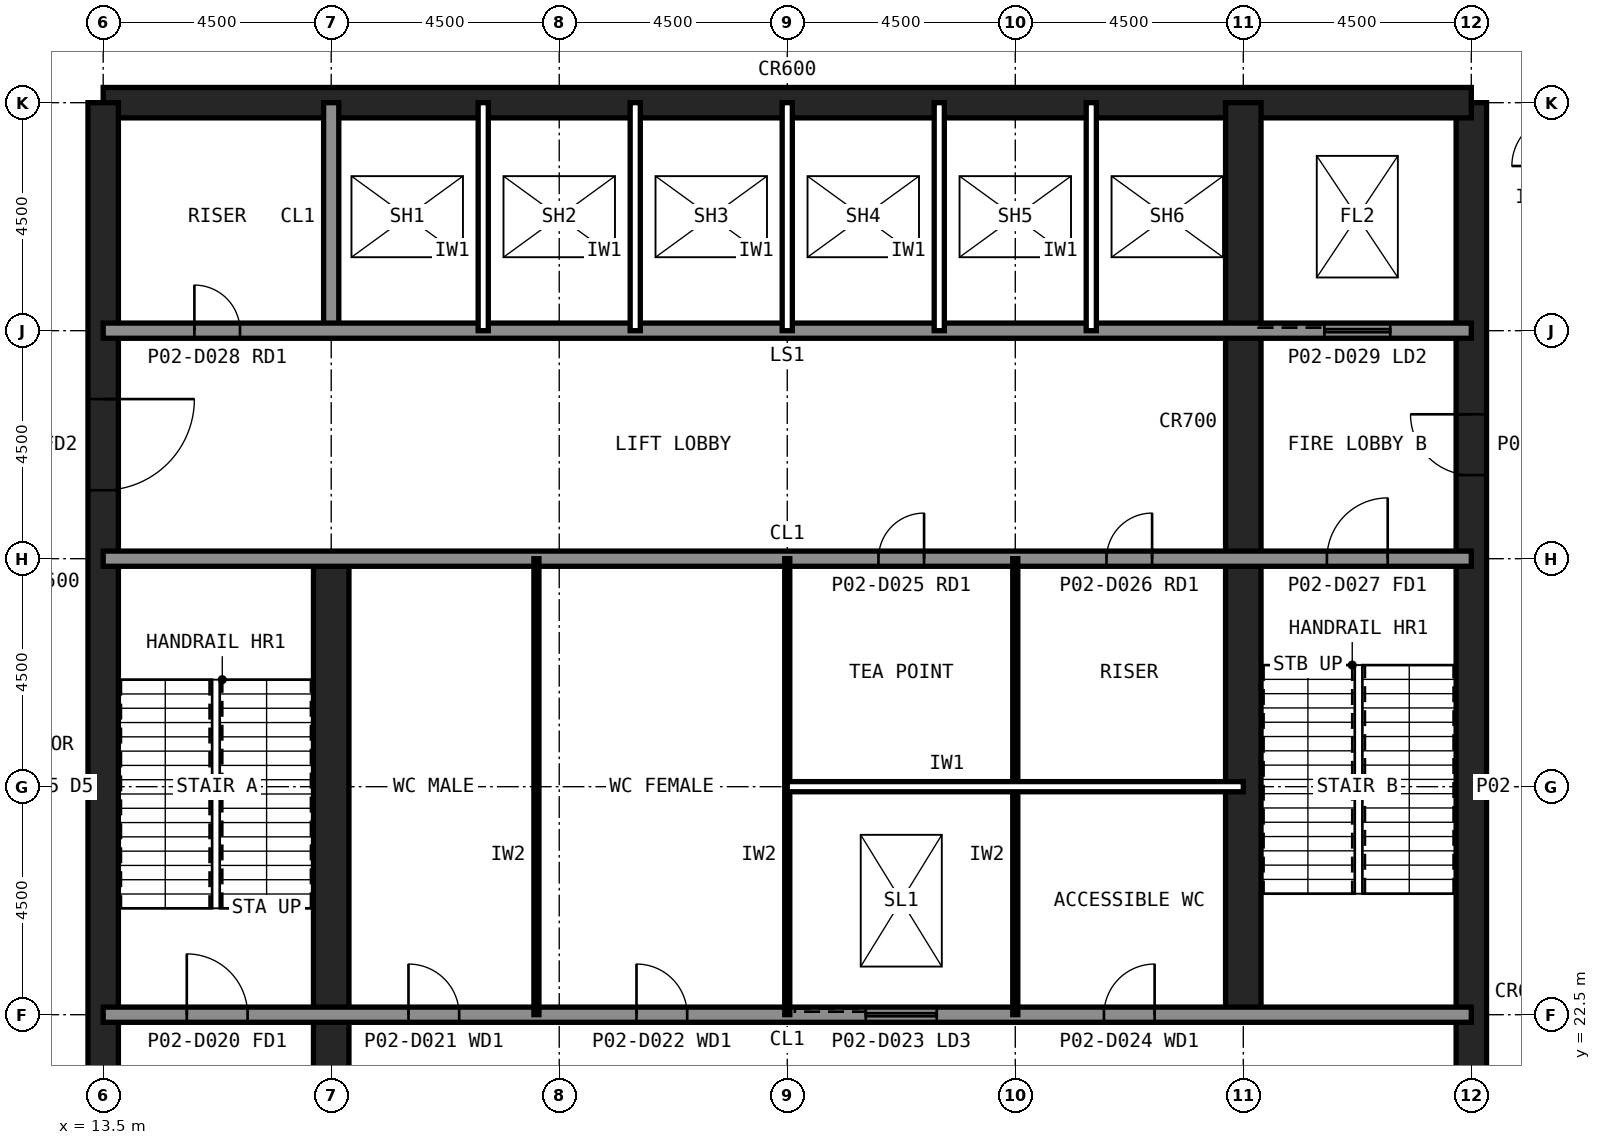
"""IFC4 building model, lengths in metres.
Left out: names, types, materials, properties, quantities, classifications, styles, units other than length and angle.
Written with IfcOpenShell. Run it as: python <this file> out.ifc"""

import sys

from ifc_helpers import new_model, si_unit, direction, frame, frame_2d, origin, place, context, subcontext, project, spatial, rectangle, extrude, element, fill, save


model = new_model("IFC4")
c1 = context("Model", 3, precision=1e-05, world=origin(), true_north=direction((0.0, 1.0)))
c2 = subcontext(c1, "Body", "Model", "MODEL_VIEW")
j1 = project(units=[si_unit("LENGTHUNIT", "METRE"), si_unit("PLANEANGLEUNIT", "RADIAN")], contexts=[c1])
p1 = place(None, origin())
s1 = spatial("IfcSite", under=j1, at=p1, CompositionType="ELEMENT")
p2 = place(p1, origin())
s2 = spatial("IfcBuilding", under=s1, at=p2, CompositionType="ELEMENT")
p3 = place(p2, frame((0.0, 0.0, 6.0)))
s3 = spatial("IfcBuildingStorey", under=s2, at=p3, CompositionType="ELEMENT", Elevation=6.0)
p4 = place(p3, frame((40.5, 13.5, 0.0), z_axis=(0.0, 0.0, 1.0), x_axis=(0.0, 1.0, 0.0)))
e1 = element("IfcWall", 1, at=p4, inside=s3, PredefinedType="SHEAR", context=c2, shape_type="SweptSolid", body=[
    extrude(rectangle(XDim=27.0, YDim=0.6, at=frame_2d((13.5, 0.0))), origin(), (0.0, 0.0, 1.0), 6.0),
])
p5 = place(p4, frame((5.85, 0.0, 0.0)))
e2 = element("IfcOpeningElement", 2, at=p5, cuts=e1, PredefinedType="OPENING", context=c2, shape_type="SweptSolid", body=[
    extrude(rectangle(XDim=1.8, YDim=2.1, at=frame_2d((0.9, 1.05))), frame((0.0, 0.31, 0.0), z_axis=(0.0, -1.0, 0.0), x_axis=(1.0, 0.0, 0.0)), (0.0, 0.0, 1.0), 0.62),
])
p6 = place(p4, frame((19.65, 0.0, 0.0)))
e3 = element("IfcOpeningElement", 3, at=p6, cuts=e1, PredefinedType="OPENING", context=c2, shape_type="SweptSolid", body=[
    extrude(rectangle(XDim=1.2, YDim=2.1, at=frame_2d((0.6, 1.05))), frame((0.0, 0.31, 0.0), z_axis=(0.0, -1.0, 0.0), x_axis=(1.0, 0.0, 0.0)), (0.0, 0.0, 1.0), 0.62),
])
p7 = place(p3, frame((40.5, 40.5, 0.0), z_axis=(0.0, 0.0, 1.0), x_axis=(-1.0, 0.0, 0.0)))
e4 = element("IfcWall", 4, at=p7, inside=s3, PredefinedType="SHEAR", context=c2, shape_type="SweptSolid", body=[
    extrude(rectangle(XDim=27.0, YDim=0.6, at=frame_2d((13.5, 0.0))), origin(), (0.0, 0.0, 1.0), 6.0),
])
p8 = place(p3, frame((13.5, 40.5, 0.0), z_axis=(0.0, 0.0, 1.0), x_axis=(0.0, -1.0, 0.0)))
e5 = element("IfcWall", 5, at=p8, inside=s3, PredefinedType="SHEAR", context=c2, shape_type="SweptSolid", body=[
    extrude(rectangle(XDim=27.0, YDim=0.6, at=frame_2d((13.5, 0.0))), origin(), (0.0, 0.0, 1.0), 6.0),
])
p9 = place(p8, frame((19.65, 0.0, 0.0)))
e6 = element("IfcOpeningElement", 6, at=p9, cuts=e5, PredefinedType="OPENING", context=c2, shape_type="SweptSolid", body=[
    extrude(rectangle(XDim=1.2, YDim=2.1, at=frame_2d((0.6, 1.05))), frame((0.0, 0.31, 0.0), z_axis=(0.0, -1.0, 0.0), x_axis=(1.0, 0.0, 0.0)), (0.0, 0.0, 1.0), 0.62),
])
p10 = place(p8, frame((5.85, 0.0, 0.0)))
e7 = element("IfcOpeningElement", 7, at=p10, cuts=e5, PredefinedType="OPENING", context=c2, shape_type="SweptSolid", body=[
    extrude(rectangle(XDim=1.8, YDim=2.1, at=frame_2d((0.9, 1.05))), frame((0.0, 0.31, 0.0), z_axis=(0.0, -1.0, 0.0), x_axis=(1.0, 0.0, 0.0)), (0.0, 0.0, 1.0), 0.62),
])
p11 = place(p3, frame((18.0, 13.5, 0.0), z_axis=(0.0, 0.0, 1.0), x_axis=(0.0, 1.0, 0.0)))
e8 = element("IfcWall", 8, at=p11, inside=s3, PredefinedType="SHEAR", context=c2, shape_type="SweptSolid", body=[
    extrude(rectangle(XDim=18.0, YDim=0.7, at=frame_2d((9.0, 0.0))), origin(), (0.0, 0.0, 1.0), 6.0),
])
p12 = place(p3, frame((18.0, 36.0, 0.0), z_axis=(0.0, 0.0, 1.0), x_axis=(0.0, 1.0, 0.0)))
e9 = element("IfcWall", 9, at=p12, inside=s3, PredefinedType="SOLIDWALL", context=c2, shape_type="SweptSolid", body=[
    extrude(rectangle(XDim=4.5, YDim=0.3, at=frame_2d((2.25, 0.0))), origin(), (0.0, 0.0, 1.0), 5.8),
])
p13 = place(p3, frame((36.0, 22.5, 0.0), z_axis=(0.0, 0.0, 1.0), x_axis=(0.0, 1.0, 0.0)))
e10 = element("IfcWall", 10, at=p13, inside=s3, PredefinedType="SHEAR", context=c2, shape_type="SweptSolid", body=[
    extrude(rectangle(XDim=18.0, YDim=0.7, at=frame_2d((9.0, 0.0))), origin(), (0.0, 0.0, 1.0), 6.0),
])
p14 = place(p3, frame((13.5, 36.0, 0.0), z_axis=(0.0, 0.0, 1.0), x_axis=(1.0, 0.0, 0.0)))
e11 = element("IfcWall", 11, at=p14, inside=s3, PredefinedType="SOLIDWALL", context=c2, shape_type="SweptSolid", body=[
    extrude(rectangle(XDim=27.0, YDim=0.3, at=frame_2d((13.5, 0.0))), origin(), (0.0, 0.0, 1.0), 5.8),
])
p15 = place(p14, frame((1.8, 0.0, 0.0)))
e12 = element("IfcOpeningElement", 12, at=p15, cuts=e11, PredefinedType="OPENING", context=c2, shape_type="SweptSolid", body=[
    extrude(rectangle(XDim=0.9, YDim=2.1, at=frame_2d((0.45, 1.05))), frame((0.0, 0.16, 0.0), z_axis=(0.0, -1.0, 0.0), x_axis=(1.0, 0.0, 0.0)), (0.0, 0.0, 1.0), 0.32),
])
p16 = place(p14, frame((24.1, 0.0, 0.0)))
e13 = element("IfcOpeningElement", 13, at=p16, cuts=e11, PredefinedType="OPENING", context=c2, shape_type="SweptSolid", body=[
    extrude(rectangle(XDim=1.3, YDim=2.2, at=frame_2d((0.65, 1.1))), frame((0.0, 0.16, 0.0), z_axis=(0.0, -1.0, 0.0), x_axis=(1.0, 0.0, 0.0)), (0.0, 0.0, 1.0), 0.32),
])
p17 = place(p3, frame((13.5, 22.5, 0.0), z_axis=(0.0, 0.0, 1.0), x_axis=(1.0, 0.0, 0.0)))
e14 = element("IfcWall", 14, at=p17, inside=s3, PredefinedType="SOLIDWALL", context=c2, shape_type="SweptSolid", body=[
    extrude(rectangle(XDim=27.0, YDim=0.3, at=frame_2d((13.5, 0.0))), origin(), (0.0, 0.0, 1.0), 5.8),
])
p18 = place(p17, frame((1.65, 0.0, 0.0)))
e15 = element("IfcOpeningElement", 15, at=p18, cuts=e14, PredefinedType="OPENING", context=c2, shape_type="SweptSolid", body=[
    extrude(rectangle(XDim=1.2, YDim=2.1, at=frame_2d((0.6, 1.05))), frame((0.0, 0.16, 0.0), z_axis=(0.0, -1.0, 0.0), x_axis=(1.0, 0.0, 0.0)), (0.0, 0.0, 1.0), 0.32),
])
p19 = place(p17, frame((6.025, 0.0, 0.0)))
e16 = element("IfcOpeningElement", 16, at=p19, cuts=e14, PredefinedType="OPENING", context=c2, shape_type="SweptSolid", body=[
    extrude(rectangle(XDim=1.0, YDim=2.1, at=frame_2d((0.5, 1.05))), frame((0.0, 0.16, 0.0), z_axis=(0.0, -1.0, 0.0), x_axis=(1.0, 0.0, 0.0)), (0.0, 0.0, 1.0), 0.32),
])
p20 = place(p17, frame((10.525, 0.0, 0.0)))
e17 = element("IfcOpeningElement", 17, at=p20, cuts=e14, PredefinedType="OPENING", context=c2, shape_type="SweptSolid", body=[
    extrude(rectangle(XDim=1.0, YDim=2.1, at=frame_2d((0.5, 1.05))), frame((0.0, 0.16, 0.0), z_axis=(0.0, -1.0, 0.0), x_axis=(1.0, 0.0, 0.0)), (0.0, 0.0, 1.0), 0.32),
])
p21 = place(p17, frame((19.75, 0.0, 0.0)))
e18 = element("IfcOpeningElement", 18, at=p21, cuts=e14, PredefinedType="OPENING", context=c2, shape_type="SweptSolid", body=[
    extrude(rectangle(XDim=1.0, YDim=2.1, at=frame_2d((0.5, 1.05))), frame((0.0, 0.16, 0.0), z_axis=(0.0, -1.0, 0.0), x_axis=(1.0, 0.0, 0.0)), (0.0, 0.0, 1.0), 0.32),
])
p22 = place(p17, frame((15.05, 0.0, 0.0)))
e19 = element("IfcOpeningElement", 19, at=p22, cuts=e14, PredefinedType="OPENING", context=c2, shape_type="SweptSolid", body=[
    extrude(rectangle(XDim=1.4, YDim=2.4, at=frame_2d((0.7, 1.2))), frame((0.0, 0.16, 0.0), z_axis=(0.0, -1.0, 0.0), x_axis=(1.0, 0.0, 0.0)), (0.0, 0.0, 1.0), 0.32),
])
p23 = place(p3, frame((13.5, 31.5, 0.0), z_axis=(0.0, 0.0, 1.0), x_axis=(1.0, 0.0, 0.0)))
e20 = element("IfcWall", 20, at=p23, inside=s3, PredefinedType="SOLIDWALL", context=c2, shape_type="SweptSolid", body=[
    extrude(rectangle(XDim=27.0, YDim=0.3, at=frame_2d((13.5, 0.0))), origin(), (0.0, 0.0, 1.0), 5.8),
])
p24 = place(p23, frame((24.15, 0.0, 0.0)))
e21 = element("IfcOpeningElement", 21, at=p24, cuts=e20, PredefinedType="OPENING", context=c2, shape_type="SweptSolid", body=[
    extrude(rectangle(XDim=1.2, YDim=2.1, at=frame_2d((0.6, 1.05))), frame((0.0, 0.16, 0.0), z_axis=(0.0, -1.0, 0.0), x_axis=(1.0, 0.0, 0.0)), (0.0, 0.0, 1.0), 0.32),
])
p25 = place(p23, frame((15.3, 0.0, 0.0)))
e22 = element("IfcOpeningElement", 22, at=p25, cuts=e20, PredefinedType="OPENING", context=c2, shape_type="SweptSolid", body=[
    extrude(rectangle(XDim=0.9, YDim=2.1, at=frame_2d((0.45, 1.05))), frame((0.0, 0.16, 0.0), z_axis=(0.0, -1.0, 0.0), x_axis=(1.0, 0.0, 0.0)), (0.0, 0.0, 1.0), 0.32),
])
p26 = place(p23, frame((19.8, 0.0, 0.0)))
e23 = element("IfcOpeningElement", 23, at=p26, cuts=e20, PredefinedType="OPENING", context=c2, shape_type="SweptSolid", body=[
    extrude(rectangle(XDim=0.9, YDim=2.1, at=frame_2d((0.45, 1.05))), frame((0.0, 0.16, 0.0), z_axis=(0.0, -1.0, 0.0), x_axis=(1.0, 0.0, 0.0)), (0.0, 0.0, 1.0), 0.32),
])
for number, where, z_axis, x_axis in (
    (24, (21.0, 36.0, 0.0), (0.0, 0.0, 1.0), (0.0, 1.0, 0.0)),
    (25, (24.0, 36.0, 0.0), (0.0, 0.0, 1.0), (0.0, 1.0, 0.0)),
    (26, (27.0, 36.0, 0.0), (0.0, 0.0, 1.0), (0.0, 1.0, 0.0)),
    (27, (30.0, 36.0, 0.0), (0.0, 0.0, 1.0), (0.0, 1.0, 0.0)),
    (28, (33.0, 36.0, 0.0), (0.0, 0.0, 1.0), (0.0, 1.0, 0.0)),
):
    element("IfcWall", number, at=place(p3, frame(where, z_axis=z_axis, x_axis=x_axis)), inside=s3, PredefinedType="PARTITIONING", context=c2, shape_type="SweptSolid", body=[
        extrude(rectangle(XDim=4.5, YDim=0.2, at=frame_2d((2.25, 0.0))), origin(), (0.0, 0.0, 1.0), 5.8),
    ])
for number, where, z_axis, x_axis in (
    (29, (22.05, 22.5, 0.0), (0.0, 0.0, 1.0), (0.0, 1.0, 0.0)),
    (30, (27.0, 22.5, 0.0), (0.0, 0.0, 1.0), (0.0, 1.0, 0.0)),
    (31, (31.5, 22.5, 0.0), (0.0, 0.0, 1.0), (0.0, 1.0, 0.0)),
):
    element("IfcWall", number, at=place(p3, frame(where, z_axis=z_axis, x_axis=x_axis)), inside=s3, PredefinedType="PLUMBINGWALL", context=c2, shape_type="SweptSolid", body=[
        extrude(rectangle(XDim=9.0, YDim=0.1, at=frame_2d((4.5, 0.0))), origin(), (0.0, 0.0, 1.0), 5.8),
    ])
p27 = place(p3, frame((27.0, 27.0, 0.0), z_axis=(0.0, 0.0, 1.0), x_axis=(1.0, 0.0, 0.0)))
e32 = element("IfcWall", 32, at=p27, inside=s3, PredefinedType="PARTITIONING", context=c2, shape_type="SweptSolid", body=[
    extrude(rectangle(XDim=9.0, YDim=0.2, at=frame_2d((4.5, 0.0))), origin(), (0.0, 0.0, 1.0), 5.8),
])
p28 = place(p10, origin())
e33 = element("IfcDoor", 33, at=p28, inside=s3, OperationType="SINGLE_SWING_LEFT", PredefinedType="DOOR", context=c2, shape_type="SweptSolid", body=[
    extrude(rectangle(XDim=1.8, YDim=2.1, at=frame_2d((0.9, 1.05))), frame((0.0, 0.025, 0.0), z_axis=(0.0, -1.0, 0.0), x_axis=(1.0, 0.0, 0.0)), (0.0, 0.0, 1.0), 0.05),
])
fill(e7, e33)
p29 = place(p6, origin())
e34 = element("IfcDoor", 34, at=p29, inside=s3, OperationType="SINGLE_SWING_RIGHT", PredefinedType="DOOR", context=c2, shape_type="SweptSolid", body=[
    extrude(rectangle(XDim=1.2, YDim=2.1, at=frame_2d((0.6, 1.05))), frame((0.0, 0.025, 0.0), z_axis=(0.0, -1.0, 0.0), x_axis=(1.0, 0.0, 0.0)), (0.0, 0.0, 1.0), 0.05),
])
fill(e3, e34)
p30 = place(p18, origin())
e35 = element("IfcDoor", 35, at=p30, inside=s3, OperationType="SINGLE_SWING_LEFT", PredefinedType="DOOR", context=c2, shape_type="SweptSolid", body=[
    extrude(rectangle(XDim=1.2, YDim=2.1, at=frame_2d((0.6, 1.05))), frame((0.0, 0.025, 0.0), z_axis=(0.0, -1.0, 0.0), x_axis=(1.0, 0.0, 0.0)), (0.0, 0.0, 1.0), 0.05),
])
fill(e15, e35)
p31 = place(p24, origin())
e36 = element("IfcDoor", 36, at=p31, inside=s3, OperationType="SINGLE_SWING_RIGHT", PredefinedType="DOOR", context=c2, shape_type="SweptSolid", body=[
    extrude(rectangle(XDim=1.2, YDim=2.1, at=frame_2d((0.6, 1.05))), frame((0.0, 0.025, 0.0), z_axis=(0.0, -1.0, 0.0), x_axis=(1.0, 0.0, 0.0)), (0.0, 0.0, 1.0), 0.05),
])
fill(e21, e36)
p32 = place(p19, origin())
e37 = element("IfcDoor", 37, at=p32, inside=s3, OperationType="SINGLE_SWING_LEFT", PredefinedType="DOOR", context=c2, shape_type="SweptSolid", body=[
    extrude(rectangle(XDim=1.0, YDim=2.1, at=frame_2d((0.5, 1.05))), frame((0.0, 0.025, 0.0), z_axis=(0.0, -1.0, 0.0), x_axis=(1.0, 0.0, 0.0)), (0.0, 0.0, 1.0), 0.05),
])
fill(e16, e37)
p33 = place(p20, origin())
e38 = element("IfcDoor", 38, at=p33, inside=s3, OperationType="SINGLE_SWING_LEFT", PredefinedType="DOOR", context=c2, shape_type="SweptSolid", body=[
    extrude(rectangle(XDim=1.0, YDim=2.1, at=frame_2d((0.5, 1.05))), frame((0.0, 0.025, 0.0), z_axis=(0.0, -1.0, 0.0), x_axis=(1.0, 0.0, 0.0)), (0.0, 0.0, 1.0), 0.05),
])
fill(e17, e38)
p34 = place(p21, origin())
e39 = element("IfcDoor", 39, at=p34, inside=s3, OperationType="SINGLE_SWING_RIGHT", PredefinedType="DOOR", context=c2, shape_type="SweptSolid", body=[
    extrude(rectangle(XDim=1.0, YDim=2.1, at=frame_2d((0.5, 1.05))), frame((0.0, 0.025, 0.0), z_axis=(0.0, -1.0, 0.0), x_axis=(1.0, 0.0, 0.0)), (0.0, 0.0, 1.0), 0.05),
])
fill(e18, e39)
p35 = place(p25, origin())
e40 = element("IfcDoor", 40, at=p35, inside=s3, OperationType="SINGLE_SWING_RIGHT", PredefinedType="DOOR", context=c2, shape_type="SweptSolid", body=[
    extrude(rectangle(XDim=0.9, YDim=2.1, at=frame_2d((0.45, 1.05))), frame((0.0, 0.025, 0.0), z_axis=(0.0, -1.0, 0.0), x_axis=(1.0, 0.0, 0.0)), (0.0, 0.0, 1.0), 0.05),
])
fill(e22, e40)
p36 = place(p26, origin())
e41 = element("IfcDoor", 41, at=p36, inside=s3, OperationType="SINGLE_SWING_RIGHT", PredefinedType="DOOR", context=c2, shape_type="SweptSolid", body=[
    extrude(rectangle(XDim=0.9, YDim=2.1, at=frame_2d((0.45, 1.05))), frame((0.0, 0.025, 0.0), z_axis=(0.0, -1.0, 0.0), x_axis=(1.0, 0.0, 0.0)), (0.0, 0.0, 1.0), 0.05),
])
fill(e23, e41)
p37 = place(p15, origin())
e42 = element("IfcDoor", 42, at=p37, inside=s3, OperationType="SINGLE_SWING_LEFT", PredefinedType="DOOR", context=c2, shape_type="SweptSolid", body=[
    extrude(rectangle(XDim=0.9, YDim=2.1, at=frame_2d((0.45, 1.05))), frame((0.0, 0.025, 0.0), z_axis=(0.0, -1.0, 0.0), x_axis=(1.0, 0.0, 0.0)), (0.0, 0.0, 1.0), 0.05),
])
fill(e12, e42)
p38 = place(p16, origin())
e43 = element("IfcDoor", 43, at=p38, inside=s3, OperationType="SLIDING_TO_LEFT", PredefinedType="DOOR", context=c2, shape_type="SweptSolid", body=[
    extrude(rectangle(XDim=1.3, YDim=2.2, at=frame_2d((0.65, 1.1))), frame((0.0, 0.025, 0.0), z_axis=(0.0, -1.0, 0.0), x_axis=(1.0, 0.0, 0.0)), (0.0, 0.0, 1.0), 0.05),
])
fill(e13, e43)
p39 = place(p22, origin())
e44 = element("IfcDoor", 44, at=p39, inside=s3, OperationType="SLIDING_TO_LEFT", PredefinedType="DOOR", context=c2, shape_type="SweptSolid", body=[
    extrude(rectangle(XDim=1.4, YDim=2.4, at=frame_2d((0.7, 1.2))), frame((0.0, 0.025, 0.0), z_axis=(0.0, -1.0, 0.0), x_axis=(1.0, 0.0, 0.0)), (0.0, 0.0, 1.0), 0.05),
])
fill(e19, e44)
save(model, sys.argv[1])
